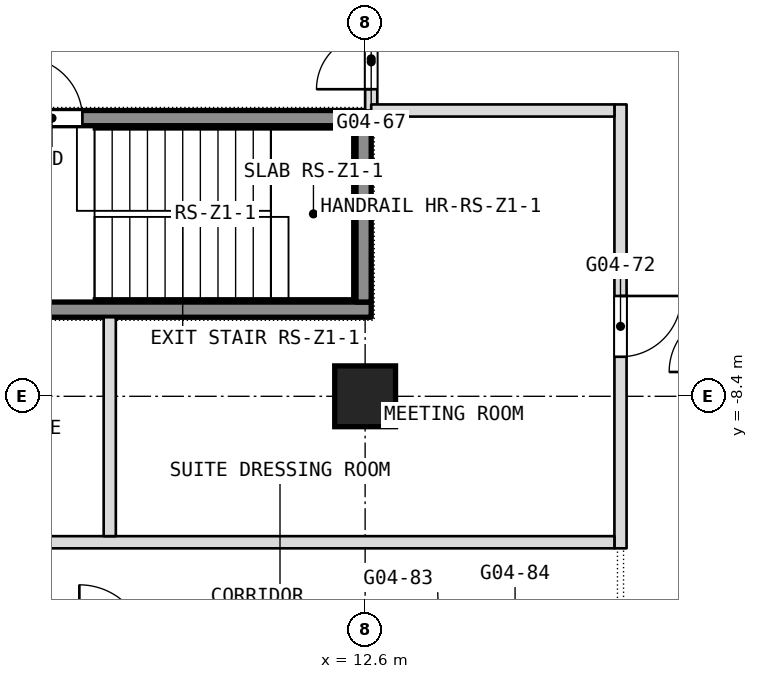
"""IFC4 building model, lengths in metres.
Left out: names, types, materials, properties, quantities, classifications, styles, units other than length and angle.
Written with IfcOpenShell. Run it as: python <this file> out.ifc"""

import sys

from ifc_helpers import new_model, si_unit, direction, frame, frame_2d, origin, origin_2d, place, context, subcontext, project, spatial, rectangle, extrude, element, fill, save


model = new_model("IFC4")
c1 = context("Model", 3, precision=1e-05, world=origin(), true_north=direction((0.0, 1.0)))
c2 = subcontext(c1, "Body", "Model", "MODEL_VIEW")
j1 = project(units=[si_unit("LENGTHUNIT", "METRE"), si_unit("PLANEANGLEUNIT", "RADIAN")], contexts=[c1])
p1 = place(None, origin())
s1 = spatial("IfcSite", under=j1, at=p1, CompositionType="ELEMENT")
p2 = place(p1, origin())
s2 = spatial("IfcBuilding", under=s1, at=p2, CompositionType="ELEMENT")
p3 = place(p2, frame((0.0, 0.0, 58.1)))
s3 = spatial("IfcBuildingStorey", under=s2, at=p3, CompositionType="ELEMENT", Elevation=58.1)
p4 = place(p3, frame((12.6, -8.4, 0.0), z_axis=(0.0, 0.0, 1.0), x_axis=(1.0, 0.0, 0.0)))
e1 = element("IfcColumn", 1, at=p4, inside=s3, PredefinedType="COLUMN", context=c2, shape_type="SweptSolid", body=[
    extrude(rectangle(XDim=1.0, YDim=1.0, at=origin_2d()), origin(), (0.0, 0.0, 1.0), 3.6),
])
p5 = place(p3, frame((16.8, -10.9, 0.0), z_axis=(0.0, 0.0, 1.0), x_axis=(0.0, 1.0, 0.0)))
e2 = element("IfcWall", 2, at=p5, inside=s3, PredefinedType="PARTITIONING", context=c2, shape_type="SweptSolid", body=[
    extrude(rectangle(XDim=7.3, YDim=0.2, at=frame_2d((3.65, 0.0))), origin(), (0.0, 0.0, 1.0), 3.34),
])
p6 = place(p5, frame((3.15, 0.0, 0.0)))
e3 = element("IfcOpeningElement", 3, at=p6, cuts=e2, PredefinedType="OPENING", context=c2, shape_type="SweptSolid", body=[
    extrude(rectangle(XDim=1.0, YDim=2.1, at=frame_2d((0.5, 1.05))), frame((0.0, 0.1, 0.0), z_axis=(0.0, -1.0, 0.0), x_axis=(1.0, 0.0, 0.0)), (0.0, 0.0, 1.0), 0.2),
])
p7 = place(p3, frame((12.7, -3.7, 0.0), z_axis=(0.0, 0.0, 1.0), x_axis=(0.0, 1.0, 0.0)))
e4 = element("IfcWall", 4, at=p7, inside=s3, PredefinedType="PARTITIONING", context=c2, shape_type="SweptSolid", body=[
    extrude(rectangle(XDim=1.7, YDim=0.2, at=frame_2d((0.85, 0.0))), origin(), (0.0, 0.0, 1.0), 3.34),
])
p8 = place(p7, frame((0.35, 0.0, 0.0)))
e5 = element("IfcOpeningElement", 5, at=p8, cuts=e4, PredefinedType="OPENING", context=c2, shape_type="SweptSolid", body=[
    extrude(rectangle(XDim=0.9, YDim=2.1, at=frame_2d((0.45, 1.05))), frame((0.0, 0.1, 0.0), z_axis=(0.0, -1.0, 0.0), x_axis=(1.0, 0.0, 0.0)), (0.0, 0.0, 1.0), 0.2),
])
p9 = place(p3, frame((-16.7, -10.8, 0.0), z_axis=(0.0, 0.0, 1.0), x_axis=(1.0, 0.0, 0.0)))
e6 = element("IfcWall", 6, at=p9, inside=s3, PredefinedType="PARTITIONING", context=c2, shape_type="SweptSolid", body=[
    extrude(rectangle(XDim=33.4, YDim=0.2, at=frame_2d((16.7, 0.0))), origin(), (0.0, 0.0, 1.0), 3.34),
])
p10 = place(p9, frame((5.7, 0.0, 0.0)))
e7 = element("IfcOpeningElement", 7, at=p10, cuts=e6, PredefinedType="OPENING", context=c2, shape_type="SweptSolid", body=[
    extrude(rectangle(XDim=1.0, YDim=2.1, at=frame_2d((0.5, 1.05))), frame((0.0, 0.1, 0.0), z_axis=(0.0, -1.0, 0.0), x_axis=(1.0, 0.0, 0.0)), (0.0, 0.0, 1.0), 0.2),
])
p11 = place(p9, frame((18.3, 0.0, 0.0)))
e8 = element("IfcOpeningElement", 8, at=p11, cuts=e6, PredefinedType="OPENING", context=c2, shape_type="SweptSolid", body=[
    extrude(rectangle(XDim=1.0, YDim=2.1, at=frame_2d((0.5, 1.05))), frame((0.0, 0.1, 0.0), z_axis=(0.0, -1.0, 0.0), x_axis=(1.0, 0.0, 0.0)), (0.0, 0.0, 1.0), 0.2),
])
p12 = place(p3, frame((8.4, -10.7, 0.0), z_axis=(0.0, 0.0, 1.0), x_axis=(0.0, 1.0, 0.0)))
e9 = element("IfcWall", 9, at=p12, inside=s3, PredefinedType="PARTITIONING", context=c2, shape_type="SweptSolid", body=[
    extrude(rectangle(XDim=3.6, YDim=0.2, at=frame_2d((1.8, 0.0))), origin(), (0.0, 0.0, 1.0), 3.34),
])
p13 = place(p3, frame((12.7, -3.7, 0.0), z_axis=(0.0, 0.0, 1.0), x_axis=(1.0, 0.0, 0.0)))
e10 = element("IfcWall", 10, at=p13, inside=s3, PredefinedType="PARTITIONING", context=c2, shape_type="SweptSolid", body=[
    extrude(rectangle(XDim=4.0, YDim=0.2, at=frame_2d((2.0, 0.0))), origin(), (0.0, 0.0, 1.0), 3.34),
])
p14 = place(p3, frame((6.5, -6.975, 0.1), z_axis=(0.0, 0.0, 1.0), x_axis=(1.0, 0.0, 0.0)))
e11 = element("IfcWall", 11, at=p14, inside=s3, PredefinedType="SHEAR", context=c2, shape_type="SweptSolid", body=[
    extrude(rectangle(XDim=6.2, YDim=0.25, at=frame_2d((3.1, 0.0))), origin(), (0.0, 0.0, 1.0), 3.6),
])
p15 = place(p3, frame((6.5, -3.825, 0.1), z_axis=(0.0, 0.0, 1.0), x_axis=(1.0, 0.0, 0.0)))
e12 = element("IfcWall", 12, at=p15, inside=s3, PredefinedType="SHEAR", context=c2, shape_type="SweptSolid", body=[
    extrude(rectangle(XDim=6.2, YDim=0.25, at=frame_2d((3.1, 0.0))), origin(), (0.0, 0.0, 1.0), 3.6),
])
p16 = place(p15, frame((0.45, 0.0, 0.0)))
e13 = element("IfcOpeningElement", 13, at=p16, cuts=e12, PredefinedType="OPENING", context=c2, shape_type="SweptSolid", body=[
    extrude(rectangle(XDim=1.0, YDim=2.1, at=frame_2d((0.5, 1.05))), frame((0.0, 0.125, 0.0), z_axis=(0.0, -1.0, 0.0), x_axis=(1.0, 0.0, 0.0)), (0.0, 0.0, 1.0), 0.25),
])
p17 = place(p3, frame((12.575, -6.85, 0.1), z_axis=(0.0, 0.0, 1.0), x_axis=(0.0, 1.0, 0.0)))
e14 = element("IfcWall", 14, at=p17, inside=s3, PredefinedType="SHEAR", context=c2, shape_type="SweptSolid", body=[
    extrude(rectangle(XDim=2.9, YDim=0.25, at=frame_2d((1.45, 0.0))), origin(), (0.0, 0.0, 1.0), 3.6),
])
p18 = place(p6, origin())
e15 = element("IfcDoor", 15, at=p18, inside=s3, OperationType="SINGLE_SWING_RIGHT", PredefinedType="DOOR", context=c2, shape_type="SweptSolid", body=[
    extrude(rectangle(XDim=1.0, YDim=2.1, at=frame_2d((0.5, 1.05))), frame((0.0, 0.025, 0.0), z_axis=(0.0, -1.0, 0.0), x_axis=(1.0, 0.0, 0.0)), (0.0, 0.0, 1.0), 0.05),
])
fill(e3, e15)
p19 = place(p8, origin())
e16 = element("IfcDoor", 16, at=p19, inside=s3, OperationType="SINGLE_SWING_RIGHT", PredefinedType="DOOR", context=c2, shape_type="SweptSolid", body=[
    extrude(rectangle(XDim=0.9, YDim=2.1, at=frame_2d((0.45, 1.05))), frame((0.0, 0.025, 0.0), z_axis=(0.0, -1.0, 0.0), x_axis=(1.0, 0.0, 0.0)), (0.0, 0.0, 1.0), 0.05),
])
fill(e5, e16)
p20 = place(p16, origin())
e17 = element("IfcDoor", 17, at=p20, inside=s3, OperationType="SINGLE_SWING_LEFT", PredefinedType="DOOR", context=c2, shape_type="SweptSolid", body=[
    extrude(rectangle(XDim=1.0, YDim=2.1, at=frame_2d((0.5, 1.05))), frame((0.0, 0.025, 0.0), z_axis=(0.0, -1.0, 0.0), x_axis=(1.0, 0.0, 0.0)), (0.0, 0.0, 1.0), 0.05),
])
fill(e13, e17)
save(model, sys.argv[1])
